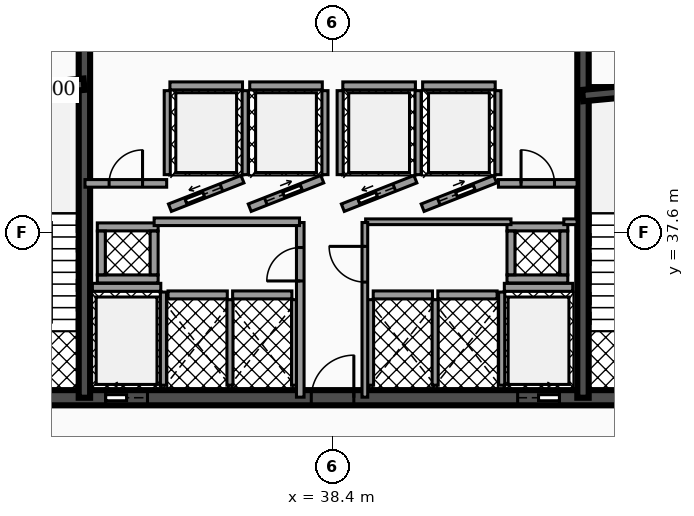
"""IFC4 building model, lengths in metres.
Left out: names, types, materials, properties, quantities, classifications, styles, units other than length and angle.
Written with IfcOpenShell. Run it as: python <this file> out.ifc"""

import sys

from ifc_helpers import new_model, si_unit, direction, frame, frame_2d, origin, place, context, subcontext, project, spatial, rectangle, extrude, element, fill, save


model = new_model("IFC4")
c1 = context("Model", 3, precision=1e-05, world=origin(), true_north=direction((0.0, 1.0)))
c2 = subcontext(c1, "Body", "Model", "MODEL_VIEW")
j1 = project(units=[si_unit("LENGTHUNIT", "METRE"), si_unit("PLANEANGLEUNIT", "RADIAN")], contexts=[c1])
p1 = place(None, origin())
s1 = spatial("IfcSite", under=j1, at=p1, CompositionType="ELEMENT")
p2 = place(p1, origin())
s2 = spatial("IfcBuilding", under=s1, at=p2, CompositionType="ELEMENT")
p3 = place(p2, frame((0.0, 0.0, 35.7)))
s3 = spatial("IfcBuildingStorey", under=s2, at=p3, CompositionType="ELEMENT", Elevation=35.7)
p4 = place(p3, frame((28.4, 33.25, 0.0), z_axis=(0.0, 0.0, 1.0), x_axis=(1.0, 0.0, 0.0)))
e1 = element("IfcWall", 1, at=p4, inside=s3, PredefinedType="SHEAR", context=c2, shape_type="SweptSolid", body=[
    extrude(rectangle(XDim=20.06, YDim=0.4, at=frame_2d((10.03, 0.0))), origin(), (0.0, 0.0, 1.0), 3.82),
])
p5 = place(p4, frame((4.03, 0.0, 0.0)))
e2 = element("IfcOpeningElement", 2, at=p5, cuts=e1, PredefinedType="OPENING", context=c2, shape_type="SweptSolid", body=[
    extrude(rectangle(XDim=1.1, YDim=2.15, at=frame_2d((0.55, 1.075))), frame((0.0, 0.21, 0.0), z_axis=(0.0, -1.0, 0.0), x_axis=(1.0, 0.0, 0.0)), (0.0, 0.0, 1.0), 0.42),
])
p6 = place(p4, frame((14.87, 0.0, 0.0)))
e3 = element("IfcOpeningElement", 3, at=p6, cuts=e1, PredefinedType="OPENING", context=c2, shape_type="SweptSolid", body=[
    extrude(rectangle(XDim=1.1, YDim=2.15, at=frame_2d((0.55, 1.075))), frame((0.0, 0.21, 0.0), z_axis=(0.0, -1.0, 0.0), x_axis=(1.0, 0.0, 0.0)), (0.0, 0.0, 1.0), 0.42),
])
p7 = place(p4, frame((1.31, 0.0, 0.0)))
e4 = element("IfcOpeningElement", 4, at=p7, cuts=e1, PredefinedType="OPENING", context=c2, shape_type="SweptSolid", body=[
    extrude(rectangle(XDim=1.1, YDim=2.2, at=frame_2d((0.55, 1.1))), frame((0.0, 0.21, 0.0), z_axis=(0.0, -1.0, 0.0), x_axis=(1.0, 0.0, 0.0)), (0.0, 0.0, 1.0), 0.42),
])
p8 = place(p4, frame((9.44, 0.0, 0.0)))
e5 = element("IfcOpeningElement", 5, at=p8, cuts=e1, PredefinedType="OPENING", context=c2, shape_type="SweptSolid", body=[
    extrude(rectangle(XDim=1.12, YDim=2.05, at=frame_2d((0.56, 1.025))), frame((0.0, 0.21, 0.0), z_axis=(0.0, -1.0, 0.0), x_axis=(1.0, 0.0, 0.0)), (0.0, 0.0, 1.0), 0.42),
])
p9 = place(p4, frame((17.65, 0.0, 0.0)))
e6 = element("IfcOpeningElement", 6, at=p9, cuts=e1, PredefinedType="OPENING", context=c2, shape_type="SweptSolid", body=[
    extrude(rectangle(XDim=1.1, YDim=2.2, at=frame_2d((0.55, 1.1))), frame((0.0, 0.21, 0.0), z_axis=(0.0, -1.0, 0.0), x_axis=(1.0, 0.0, 0.0)), (0.0, 0.0, 1.0), 0.42),
])
for number, where, z_axis, x_axis in (
    (7, (31.87, 33.25, 0.0), (0.0, 0.0, 1.0), (0.0, 1.0, 0.0)),
    (8, (44.99, 33.25, 0.0), (0.0, 0.0, 1.0), (0.0, 1.0, 0.0)),
):
    element("IfcWall", number, at=place(p3, frame(where, z_axis=z_axis, x_axis=x_axis)), inside=s3, PredefinedType="SHEAR", context=c2, shape_type="SweptSolid", body=[
        extrude(rectangle(XDim=10.2, YDim=0.3, at=frame_2d((5.1, 0.0))), origin(), (0.0, 0.0, 1.0), 3.82),
    ])
p10 = place(p3, frame((28.64, 41.2, 0.0), z_axis=(0.0, 0.0, 1.0), x_axis=(0.995687118776, 0.092774789157, 0.0)))
e9 = element("IfcWall", 9, at=p10, inside=s3, PredefinedType="SHEAR", context=c2, shape_type="SweptSolid", body=[
    extrude(rectangle(XDim=3.234, YDim=0.3, at=frame_2d((1.617, 0.0))), origin(), (0.0, 0.0, 1.0), 3.82),
])
p11 = place(p3, frame((44.98, 41.2, 0.0), z_axis=(0.0, 0.0, 1.0), x_axis=(0.995686468965, 0.09278176286, 0.0)))
e10 = element("IfcWall", 10, at=p11, inside=s3, PredefinedType="SHEAR", context=c2, shape_type="SweptSolid", body=[
    extrude(rectangle(XDim=3.234, YDim=0.3, at=frame_2d((1.617, 0.0))), origin(), (0.0, 0.0, 1.0), 3.82),
])
p12 = place(p3, frame((32.08, 36.155, 0.0), z_axis=(0.0, 0.0, 1.0), x_axis=(1.0, 0.0, 0.0)))
e11 = element("IfcWall", 11, at=p12, inside=s3, PredefinedType="SOLIDWALL", context=c2, shape_type="SweptSolid", body=[
    extrude(rectangle(XDim=1.8, YDim=0.21, at=frame_2d((0.9, 0.0))), origin(), (0.0, 0.0, 1.0), 2.792),
])
p13 = place(p3, frame((33.95, 33.58, 0.0), z_axis=(0.0, 0.0, 1.0), x_axis=(0.0, 1.0, 0.0)))
e12 = element("IfcWall", 12, at=p13, inside=s3, PredefinedType="SOLIDWALL", context=c2, shape_type="SweptSolid", body=[
    extrude(rectangle(XDim=2.45, YDim=0.16, at=frame_2d((1.225, 0.0))), origin(), (0.0, 0.0, 1.0), 2.792),
])
p14 = place(p3, frame((42.92, 36.155, 0.0), z_axis=(0.0, 0.0, 1.0), x_axis=(1.0, 0.0, 0.0)))
e13 = element("IfcWall", 13, at=p14, inside=s3, PredefinedType="SOLIDWALL", context=c2, shape_type="SweptSolid", body=[
    extrude(rectangle(XDim=1.8, YDim=0.21, at=frame_2d((0.9, 0.0))), origin(), (0.0, 0.0, 1.0), 2.792),
])
p15 = place(p3, frame((42.85, 33.58, 0.0), z_axis=(0.0, 0.0, 1.0), x_axis=(0.0, 1.0, 0.0)))
e14 = element("IfcWall", 14, at=p15, inside=s3, PredefinedType="SOLIDWALL", context=c2, shape_type="SweptSolid", body=[
    extrude(rectangle(XDim=2.45, YDim=0.16, at=frame_2d((1.225, 0.0))), origin(), (0.0, 0.0, 1.0), 2.792),
])
p16 = place(p3, frame((34.12, 38.25, 0.0), z_axis=(0.0, 0.0, 1.0), x_axis=(0.930804993012, 0.36551616241, 0.0)))
e15 = element("IfcWall", 15, at=p16, inside=s3, PredefinedType="SOLIDWALL", context=c2, shape_type="SweptSolid", body=[
    extrude(rectangle(XDim=2.052, YDim=0.21, at=frame_2d((1.026, 0.0))), origin(), (0.0, 0.0, 1.0), 2.792),
])
p17 = place(p16, frame((0.455, 0.0, 0.0)))
e16 = element("IfcOpeningElement", 16, at=p17, cuts=e15, PredefinedType="OPENING", context=c2, shape_type="SweptSolid", body=[
    extrude(rectangle(XDim=1.0, YDim=2.1, at=frame_2d((0.5, 1.05))), frame((0.0, 0.115, 0.0), z_axis=(0.0, -1.0, 0.0), x_axis=(1.0, 0.0, 0.0)), (0.0, 0.0, 1.0), 0.23),
])
p18 = place(p3, frame((34.12, 41.455, 0.0), z_axis=(0.0, 0.0, 1.0), x_axis=(1.0, 0.0, 0.0)))
e17 = element("IfcWall", 17, at=p18, inside=s3, PredefinedType="SOLIDWALL", context=c2, shape_type="SweptSolid", body=[
    extrude(rectangle(XDim=1.91, YDim=0.21, at=frame_2d((0.955, 0.0))), origin(), (0.0, 0.0, 1.0), 2.792),
])
for number, where, z_axis, x_axis in (
    (18, (34.05, 39.12, 0.0), (0.0, 0.0, 1.0), (0.0, 1.0, 0.0)),
    (19, (36.1, 39.12, 0.0), (0.0, 0.0, 1.0), (0.0, 1.0, 0.0)),
):
    element("IfcWall", number, at=place(p3, frame(where, z_axis=z_axis, x_axis=x_axis)), inside=s3, PredefinedType="SOLIDWALL", context=c2, shape_type="SweptSolid", body=[
        extrude(rectangle(XDim=2.21, YDim=0.16, at=frame_2d((1.105, 0.0))), origin(), (0.0, 0.0, 1.0), 2.792),
    ])
p19 = place(p3, frame((36.22, 38.25, 0.0), z_axis=(0.0, 0.0, 1.0), x_axis=(0.930804993012, 0.36551616241, 0.0)))
e20 = element("IfcWall", 20, at=p19, inside=s3, PredefinedType="SOLIDWALL", context=c2, shape_type="SweptSolid", body=[
    extrude(rectangle(XDim=2.052, YDim=0.21, at=frame_2d((1.026, 0.0))), origin(), (0.0, 0.0, 1.0), 2.792),
])
p20 = place(p19, frame((0.455, 0.0, 0.0)))
e21 = element("IfcOpeningElement", 21, at=p20, cuts=e20, PredefinedType="OPENING", context=c2, shape_type="SweptSolid", body=[
    extrude(rectangle(XDim=1.0, YDim=2.1, at=frame_2d((0.5, 1.05))), frame((0.0, 0.115, 0.0), z_axis=(0.0, -1.0, 0.0), x_axis=(1.0, 0.0, 0.0)), (0.0, 0.0, 1.0), 0.23),
])
p21 = place(p3, frame((36.22, 41.455, 0.0), z_axis=(0.0, 0.0, 1.0), x_axis=(1.0, 0.0, 0.0)))
e22 = element("IfcWall", 22, at=p21, inside=s3, PredefinedType="SOLIDWALL", context=c2, shape_type="SweptSolid", body=[
    extrude(rectangle(XDim=1.91, YDim=0.21, at=frame_2d((0.955, 0.0))), origin(), (0.0, 0.0, 1.0), 2.792),
])
p22 = place(p3, frame((38.2, 39.12, 0.0), z_axis=(0.0, 0.0, 1.0), x_axis=(0.0, 1.0, 0.0)))
e23 = element("IfcWall", 23, at=p22, inside=s3, PredefinedType="SOLIDWALL", context=c2, shape_type="SweptSolid", body=[
    extrude(rectangle(XDim=2.21, YDim=0.16, at=frame_2d((1.105, 0.0))), origin(), (0.0, 0.0, 1.0), 2.792),
])
p23 = place(p3, frame((38.67, 38.25, 0.0), z_axis=(0.0, 0.0, 1.0), x_axis=(0.930820886763, 0.3654756856, 0.0)))
e24 = element("IfcWall", 24, at=p23, inside=s3, PredefinedType="SOLIDWALL", context=c2, shape_type="SweptSolid", body=[
    extrude(rectangle(XDim=2.052, YDim=0.21, at=frame_2d((1.026, 0.0))), origin(), (0.0, 0.0, 1.0), 2.792),
])
p24 = place(p23, frame((0.455, 0.0, 0.0)))
e25 = element("IfcOpeningElement", 25, at=p24, cuts=e24, PredefinedType="OPENING", context=c2, shape_type="SweptSolid", body=[
    extrude(rectangle(XDim=1.0, YDim=2.1, at=frame_2d((0.5, 1.05))), frame((0.0, 0.115, 0.0), z_axis=(0.0, -1.0, 0.0), x_axis=(1.0, 0.0, 0.0)), (0.0, 0.0, 1.0), 0.23),
])
p25 = place(p3, frame((38.67, 41.455, 0.0), z_axis=(0.0, 0.0, 1.0), x_axis=(1.0, 0.0, 0.0)))
e26 = element("IfcWall", 26, at=p25, inside=s3, PredefinedType="SOLIDWALL", context=c2, shape_type="SweptSolid", body=[
    extrude(rectangle(XDim=1.91, YDim=0.21, at=frame_2d((0.955, 0.0))), origin(), (0.0, 0.0, 1.0), 2.792),
])
for number, where, z_axis, x_axis in (
    (27, (38.6, 39.12, 0.0), (0.0, 0.0, 1.0), (0.0, 1.0, 0.0)),
    (28, (40.65, 39.12, 0.0), (0.0, 0.0, 1.0), (0.0, 1.0, 0.0)),
):
    element("IfcWall", number, at=place(p3, frame(where, z_axis=z_axis, x_axis=x_axis)), inside=s3, PredefinedType="SOLIDWALL", context=c2, shape_type="SweptSolid", body=[
        extrude(rectangle(XDim=2.21, YDim=0.16, at=frame_2d((1.105, 0.0))), origin(), (0.0, 0.0, 1.0), 2.792),
    ])
p26 = place(p3, frame((40.77, 38.25, 0.0), z_axis=(0.0, 0.0, 1.0), x_axis=(0.930804993012, 0.36551616241, 0.0)))
e29 = element("IfcWall", 29, at=p26, inside=s3, PredefinedType="SOLIDWALL", context=c2, shape_type="SweptSolid", body=[
    extrude(rectangle(XDim=2.052, YDim=0.21, at=frame_2d((1.026, 0.0))), origin(), (0.0, 0.0, 1.0), 2.792),
])
p27 = place(p26, frame((0.455, 0.0, 0.0)))
e30 = element("IfcOpeningElement", 30, at=p27, cuts=e29, PredefinedType="OPENING", context=c2, shape_type="SweptSolid", body=[
    extrude(rectangle(XDim=1.0, YDim=2.1, at=frame_2d((0.5, 1.05))), frame((0.0, 0.115, 0.0), z_axis=(0.0, -1.0, 0.0), x_axis=(1.0, 0.0, 0.0)), (0.0, 0.0, 1.0), 0.23),
])
p28 = place(p3, frame((40.77, 41.455, 0.0), z_axis=(0.0, 0.0, 1.0), x_axis=(1.0, 0.0, 0.0)))
e31 = element("IfcWall", 31, at=p28, inside=s3, PredefinedType="SOLIDWALL", context=c2, shape_type="SweptSolid", body=[
    extrude(rectangle(XDim=1.91, YDim=0.21, at=frame_2d((0.955, 0.0))), origin(), (0.0, 0.0, 1.0), 2.792),
])
p29 = place(p3, frame((42.75, 39.12, 0.0), z_axis=(0.0, 0.0, 1.0), x_axis=(0.0, 1.0, 0.0)))
e32 = element("IfcWall", 32, at=p29, inside=s3, PredefinedType="SOLIDWALL", context=c2, shape_type="SweptSolid", body=[
    extrude(rectangle(XDim=2.21, YDim=0.16, at=frame_2d((1.105, 0.0))), origin(), (0.0, 0.0, 1.0), 2.792),
])
p30 = place(p3, frame((34.07, 35.955, 0.0), z_axis=(0.0, 0.0, 1.0), x_axis=(1.0, 0.0, 0.0)))
e33 = element("IfcWall", 33, at=p30, inside=s3, PredefinedType="SOLIDWALL", context=c2, shape_type="SweptSolid", body=[
    extrude(rectangle(XDim=1.56, YDim=0.21, at=frame_2d((0.78, 0.0))), origin(), (0.0, 0.0, 1.0), 2.792),
])
p31 = place(p3, frame((35.7, 33.58, 0.0), z_axis=(0.0, 0.0, 1.0), x_axis=(0.0, 1.0, 0.0)))
e34 = element("IfcWall", 34, at=p31, inside=s3, PredefinedType="SOLIDWALL", context=c2, shape_type="SweptSolid", body=[
    extrude(rectangle(XDim=2.25, YDim=0.16, at=frame_2d((1.125, 0.0))), origin(), (0.0, 0.0, 1.0), 2.792),
])
p32 = place(p3, frame((35.77, 35.955, 0.0), z_axis=(0.0, 0.0, 1.0), x_axis=(1.0, 0.0, 0.0)))
e35 = element("IfcWall", 35, at=p32, inside=s3, PredefinedType="SOLIDWALL", context=c2, shape_type="SweptSolid", body=[
    extrude(rectangle(XDim=1.56, YDim=0.21, at=frame_2d((0.78, 0.0))), origin(), (0.0, 0.0, 1.0), 2.792),
])
p33 = place(p3, frame((37.4, 33.58, 0.0), z_axis=(0.0, 0.0, 1.0), x_axis=(0.0, 1.0, 0.0)))
e36 = element("IfcWall", 36, at=p33, inside=s3, PredefinedType="SOLIDWALL", context=c2, shape_type="SweptSolid", body=[
    extrude(rectangle(XDim=2.25, YDim=0.16, at=frame_2d((1.125, 0.0))), origin(), (0.0, 0.0, 1.0), 2.792),
])
p34 = place(p3, frame((39.47, 35.955, 0.0), z_axis=(0.0, 0.0, 1.0), x_axis=(1.0, 0.0, 0.0)))
e37 = element("IfcWall", 37, at=p34, inside=s3, PredefinedType="SOLIDWALL", context=c2, shape_type="SweptSolid", body=[
    extrude(rectangle(XDim=1.56, YDim=0.21, at=frame_2d((0.78, 0.0))), origin(), (0.0, 0.0, 1.0), 2.792),
])
for number, where, z_axis, x_axis in (
    (38, (39.4, 33.58, 0.0), (0.0, 0.0, 1.0), (0.0, 1.0, 0.0)),
    (39, (41.1, 33.58, 0.0), (0.0, 0.0, 1.0), (0.0, 1.0, 0.0)),
):
    element("IfcWall", number, at=place(p3, frame(where, z_axis=z_axis, x_axis=x_axis)), inside=s3, PredefinedType="SOLIDWALL", context=c2, shape_type="SweptSolid", body=[
        extrude(rectangle(XDim=2.25, YDim=0.16, at=frame_2d((1.125, 0.0))), origin(), (0.0, 0.0, 1.0), 2.792),
    ])
p35 = place(p3, frame((41.17, 35.955, 0.0), z_axis=(0.0, 0.0, 1.0), x_axis=(1.0, 0.0, 0.0)))
e40 = element("IfcWall", 40, at=p35, inside=s3, PredefinedType="SOLIDWALL", context=c2, shape_type="SweptSolid", body=[
    extrude(rectangle(XDim=1.56, YDim=0.21, at=frame_2d((0.78, 0.0))), origin(), (0.0, 0.0, 1.0), 2.792),
])
for number, where, z_axis, x_axis in (
    (41, (32.21, 36.375, 0.0), (0.0, 0.0, 1.0), (1.0, 0.0, 0.0)),
    (42, (32.21, 37.745, 0.0), (0.0, 0.0, 1.0), (1.0, 0.0, 0.0)),
):
    element("IfcWall", number, at=place(p3, frame(where, z_axis=z_axis, x_axis=x_axis)), inside=s3, PredefinedType="SOLIDWALL", context=c2, shape_type="SweptSolid", body=[
        extrude(rectangle(XDim=1.6, YDim=0.21, at=frame_2d((0.8, 0.0))), origin(), (0.0, 0.0, 1.0), 3.82),
    ])
for number, where, z_axis, x_axis in (
    (43, (32.315, 36.485, 0.0), (0.0, 0.0, 1.0), (0.0, 1.0, 0.0)),
    (44, (33.705, 36.485, 0.0), (0.0, 0.0, 1.0), (0.0, 1.0, 0.0)),
):
    element("IfcWall", number, at=place(p3, frame(where, z_axis=z_axis, x_axis=x_axis)), inside=s3, PredefinedType="SOLIDWALL", context=c2, shape_type="SweptSolid", body=[
        extrude(rectangle(XDim=1.15, YDim=0.21, at=frame_2d((0.575, 0.0))), origin(), (0.0, 0.0, 1.0), 3.82),
    ])
for number, where, z_axis, x_axis in (
    (45, (42.99, 36.375, 0.0), (0.0, 0.0, 1.0), (1.0, 0.0, 0.0)),
    (46, (42.99, 37.745, 0.0), (0.0, 0.0, 1.0), (1.0, 0.0, 0.0)),
):
    element("IfcWall", number, at=place(p3, frame(where, z_axis=z_axis, x_axis=x_axis)), inside=s3, PredefinedType="SOLIDWALL", context=c2, shape_type="SweptSolid", body=[
        extrude(rectangle(XDim=1.6, YDim=0.21, at=frame_2d((0.8, 0.0))), origin(), (0.0, 0.0, 1.0), 3.82),
    ])
for number, where, z_axis, x_axis in (
    (47, (43.095, 36.485, 0.0), (0.0, 0.0, 1.0), (0.0, 1.0, 0.0)),
    (48, (44.485, 36.485, 0.0), (0.0, 0.0, 1.0), (0.0, 1.0, 0.0)),
):
    element("IfcWall", number, at=place(p3, frame(where, z_axis=z_axis, x_axis=x_axis)), inside=s3, PredefinedType="SOLIDWALL", context=c2, shape_type="SweptSolid", body=[
        extrude(rectangle(XDim=1.15, YDim=0.21, at=frame_2d((0.575, 0.0))), origin(), (0.0, 0.0, 1.0), 3.82),
    ])
p36 = place(p3, frame((37.55, 33.265, 0.0), z_axis=(0.0, 0.0, 1.0), x_axis=(0.0, 1.0, 0.0)))
e49 = element("IfcWall", 49, at=p36, inside=s3, PredefinedType="PARTITIONING", context=c2, shape_type="SweptSolid", body=[
    extrude(rectangle(XDim=4.595, YDim=0.2, at=frame_2d((2.298, 0.0))), origin(), (0.0, 0.0, 1.0), 2.777),
])
p37 = place(p36, frame((3.058, 0.0, 0.0)))
e50 = element("IfcOpeningElement", 50, at=p37, cuts=e49, PredefinedType="OPENING", context=c2, shape_type="SweptSolid", body=[
    extrude(rectangle(XDim=0.88, YDim=2.05, at=frame_2d((0.44, 1.025))), frame((0.0, 0.11, 0.0), z_axis=(0.0, -1.0, 0.0), x_axis=(1.0, 0.0, 0.0)), (0.0, 0.0, 1.0), 0.22),
])
p38 = place(p3, frame((33.705, 37.88, 0.0), z_axis=(0.0, 0.0, 1.0), x_axis=(1.0, 0.0, 0.0)))
e51 = element("IfcWall", 51, at=p38, inside=s3, PredefinedType="PARTITIONING", context=c2, shape_type="SweptSolid", body=[
    extrude(rectangle(XDim=3.825, YDim=0.2, at=frame_2d((1.913, 0.0))), origin(), (0.0, 0.0, 1.0), 2.777),
])
p39 = place(p3, frame((31.885, 38.89, 0.0), z_axis=(0.0, 0.0, 1.0), x_axis=(1.0, 0.0, 0.0)))
e52 = element("IfcWall", 52, at=p39, inside=s3, PredefinedType="PARTITIONING", context=c2, shape_type="SweptSolid", body=[
    extrude(rectangle(XDim=2.15, YDim=0.2, at=frame_2d((1.075, 0.0))), origin(), (0.0, 0.0, 1.0), 2.777),
])
p40 = place(p39, frame((0.635, 0.0, 0.0)))
e53 = element("IfcOpeningElement", 53, at=p40, cuts=e52, PredefinedType="OPENING", context=c2, shape_type="SweptSolid", body=[
    extrude(rectangle(XDim=0.88, YDim=2.05, at=frame_2d((0.44, 1.025))), frame((0.0, 0.11, 0.0), z_axis=(0.0, -1.0, 0.0), x_axis=(1.0, 0.0, 0.0)), (0.0, 0.0, 1.0), 0.22),
])
p41 = place(p3, frame((42.765, 38.89, 0.0), z_axis=(0.0, 0.0, 1.0), x_axis=(1.0, 0.0, 0.0)))
e54 = element("IfcWall", 54, at=p41, inside=s3, PredefinedType="PARTITIONING", context=c2, shape_type="SweptSolid", body=[
    extrude(rectangle(XDim=2.07, YDim=0.2, at=frame_2d((1.035, 0.0))), origin(), (0.0, 0.0, 1.0), 2.777),
])
p42 = place(p41, frame((0.595, 0.0, 0.0)))
e55 = element("IfcOpeningElement", 55, at=p42, cuts=e54, PredefinedType="OPENING", context=c2, shape_type="SweptSolid", body=[
    extrude(rectangle(XDim=0.88, YDim=2.05, at=frame_2d((0.44, 1.025))), frame((0.0, 0.11, 0.0), z_axis=(0.0, -1.0, 0.0), x_axis=(1.0, 0.0, 0.0)), (0.0, 0.0, 1.0), 0.22),
])
p43 = place(p3, frame((39.27, 37.88, 0.0), z_axis=(0.0, 0.0, 1.0), x_axis=(1.0, 0.0, 0.0)))
e56 = element("IfcWall", 56, at=p43, inside=s3, PredefinedType="PARTITIONING", context=c2, shape_type="SweptSolid", body=[
    extrude(rectangle(XDim=3.825, YDim=0.15, at=frame_2d((1.913, 0.0))), origin(), (0.0, 0.0, 1.0), 2.777),
])
p44 = place(p3, frame((44.485, 37.88, 0.0), z_axis=(0.0, 0.0, 1.0), x_axis=(1.0, 0.0, 0.0)))
e57 = element("IfcWall", 57, at=p44, inside=s3, PredefinedType="PARTITIONING", context=c2, shape_type="SweptSolid", body=[
    extrude(rectangle(XDim=0.35, YDim=0.15, at=frame_2d((0.175, 0.0))), origin(), (0.0, 0.0, 1.0), 2.777),
])
p45 = place(p3, frame((39.25, 33.265, 0.0), z_axis=(0.0, 0.0, 1.0), x_axis=(0.0, 1.0, 0.0)))
e58 = element("IfcWall", 58, at=p45, inside=s3, PredefinedType="PARTITIONING", context=c2, shape_type="SweptSolid", body=[
    extrude(rectangle(XDim=4.595, YDim=0.15, at=frame_2d((2.298, 0.0))), origin(), (0.0, 0.0, 1.0), 2.777),
])
p46 = place(p45, frame((3.028, 0.0, 0.0)))
e59 = element("IfcOpeningElement", 59, at=p46, cuts=e58, PredefinedType="OPENING", context=c2, shape_type="SweptSolid", body=[
    extrude(rectangle(XDim=0.94, YDim=2.05, at=frame_2d((0.47, 1.025))), frame((0.0, 0.085, 0.0), z_axis=(0.0, -1.0, 0.0), x_axis=(1.0, 0.0, 0.0)), (0.0, 0.0, 1.0), 0.17),
])
p47 = place(p5, origin())
e60 = element("IfcDoor", 60, at=p47, inside=s3, OperationType="SLIDING_TO_LEFT", PredefinedType="DOOR", context=c2, shape_type="SweptSolid", body=[
    extrude(rectangle(XDim=1.1, YDim=2.15, at=frame_2d((0.55, 1.075))), frame((0.0, 0.025, 0.0), z_axis=(0.0, -1.0, 0.0), x_axis=(1.0, 0.0, 0.0)), (0.0, 0.0, 1.0), 0.05),
])
fill(e2, e60)
p48 = place(p6, origin())
e61 = element("IfcDoor", 61, at=p48, inside=s3, OperationType="SLIDING_TO_RIGHT", PredefinedType="DOOR", context=c2, shape_type="SweptSolid", body=[
    extrude(rectangle(XDim=1.1, YDim=2.15, at=frame_2d((0.55, 1.075))), frame((0.0, 0.025, 0.0), z_axis=(0.0, -1.0, 0.0), x_axis=(1.0, 0.0, 0.0)), (0.0, 0.0, 1.0), 0.05),
])
fill(e3, e61)
p49 = place(p17, origin())
e62 = element("IfcDoor", 62, at=p49, inside=s3, OperationType="SLIDING_TO_LEFT", PredefinedType="DOOR", context=c2, shape_type="SweptSolid", body=[
    extrude(rectangle(XDim=1.0, YDim=2.1, at=frame_2d((0.5, 1.05))), frame((0.0, 0.025, 0.0), z_axis=(0.0, -1.0, 0.0), x_axis=(1.0, 0.0, 0.0)), (0.0, 0.0, 1.0), 0.05),
])
fill(e16, e62)
p50 = place(p20, origin())
e63 = element("IfcDoor", 63, at=p50, inside=s3, OperationType="SLIDING_TO_RIGHT", PredefinedType="DOOR", context=c2, shape_type="SweptSolid", body=[
    extrude(rectangle(XDim=1.0, YDim=2.1, at=frame_2d((0.5, 1.05))), frame((0.0, 0.025, 0.0), z_axis=(0.0, -1.0, 0.0), x_axis=(1.0, 0.0, 0.0)), (0.0, 0.0, 1.0), 0.05),
])
fill(e21, e63)
p51 = place(p24, origin())
e64 = element("IfcDoor", 64, at=p51, inside=s3, OperationType="SLIDING_TO_LEFT", PredefinedType="DOOR", context=c2, shape_type="SweptSolid", body=[
    extrude(rectangle(XDim=1.0, YDim=2.1, at=frame_2d((0.5, 1.05))), frame((0.0, 0.025, 0.0), z_axis=(0.0, -1.0, 0.0), x_axis=(1.0, 0.0, 0.0)), (0.0, 0.0, 1.0), 0.05),
])
fill(e25, e64)
p52 = place(p27, origin())
e65 = element("IfcDoor", 65, at=p52, inside=s3, OperationType="SLIDING_TO_RIGHT", PredefinedType="DOOR", context=c2, shape_type="SweptSolid", body=[
    extrude(rectangle(XDim=1.0, YDim=2.1, at=frame_2d((0.5, 1.05))), frame((0.0, 0.025, 0.0), z_axis=(0.0, -1.0, 0.0), x_axis=(1.0, 0.0, 0.0)), (0.0, 0.0, 1.0), 0.05),
])
fill(e30, e65)
p53 = place(p8, origin())
e66 = element("IfcDoor", 66, at=p53, inside=s3, OperationType="SINGLE_SWING_RIGHT", PredefinedType="DOOR", context=c2, shape_type="SweptSolid", body=[
    extrude(rectangle(XDim=1.12, YDim=2.05, at=frame_2d((0.56, 1.025))), frame((0.0, 0.025, 0.0), z_axis=(0.0, -1.0, 0.0), x_axis=(1.0, 0.0, 0.0)), (0.0, 0.0, 1.0), 0.05),
])
fill(e5, e66)
p54 = place(p37, origin())
e67 = element("IfcDoor", 67, at=p54, inside=s3, OperationType="SINGLE_SWING_LEFT", PredefinedType="DOOR", context=c2, shape_type="SweptSolid", body=[
    extrude(rectangle(XDim=0.88, YDim=2.05, at=frame_2d((0.44, 1.025))), frame((0.0, 0.025, 0.0), z_axis=(0.0, -1.0, 0.0), x_axis=(1.0, 0.0, 0.0)), (0.0, 0.0, 1.0), 0.05),
])
fill(e50, e67)
p55 = place(p40, origin())
e68 = element("IfcDoor", 68, at=p55, inside=s3, OperationType="SINGLE_SWING_RIGHT", PredefinedType="DOOR", context=c2, shape_type="SweptSolid", body=[
    extrude(rectangle(XDim=0.88, YDim=2.05, at=frame_2d((0.44, 1.025))), frame((0.0, 0.025, 0.0), z_axis=(0.0, -1.0, 0.0), x_axis=(1.0, 0.0, 0.0)), (0.0, 0.0, 1.0), 0.05),
])
fill(e53, e68)
p56 = place(p42, origin())
e69 = element("IfcDoor", 69, at=p56, inside=s3, OperationType="SINGLE_SWING_LEFT", PredefinedType="DOOR", context=c2, shape_type="SweptSolid", body=[
    extrude(rectangle(XDim=0.88, YDim=2.05, at=frame_2d((0.44, 1.025))), frame((0.0, 0.025, 0.0), z_axis=(0.0, -1.0, 0.0), x_axis=(1.0, 0.0, 0.0)), (0.0, 0.0, 1.0), 0.05),
])
fill(e55, e69)
p57 = place(p46, origin())
e70 = element("IfcDoor", 70, at=p57, inside=s3, OperationType="SINGLE_SWING_RIGHT", PredefinedType="DOOR", context=c2, shape_type="SweptSolid", body=[
    extrude(rectangle(XDim=0.94, YDim=2.05, at=frame_2d((0.47, 1.025))), frame((0.0, 0.025, 0.0), z_axis=(0.0, -1.0, 0.0), x_axis=(1.0, 0.0, 0.0)), (0.0, 0.0, 1.0), 0.05),
])
fill(e59, e70)
save(model, sys.argv[1])
